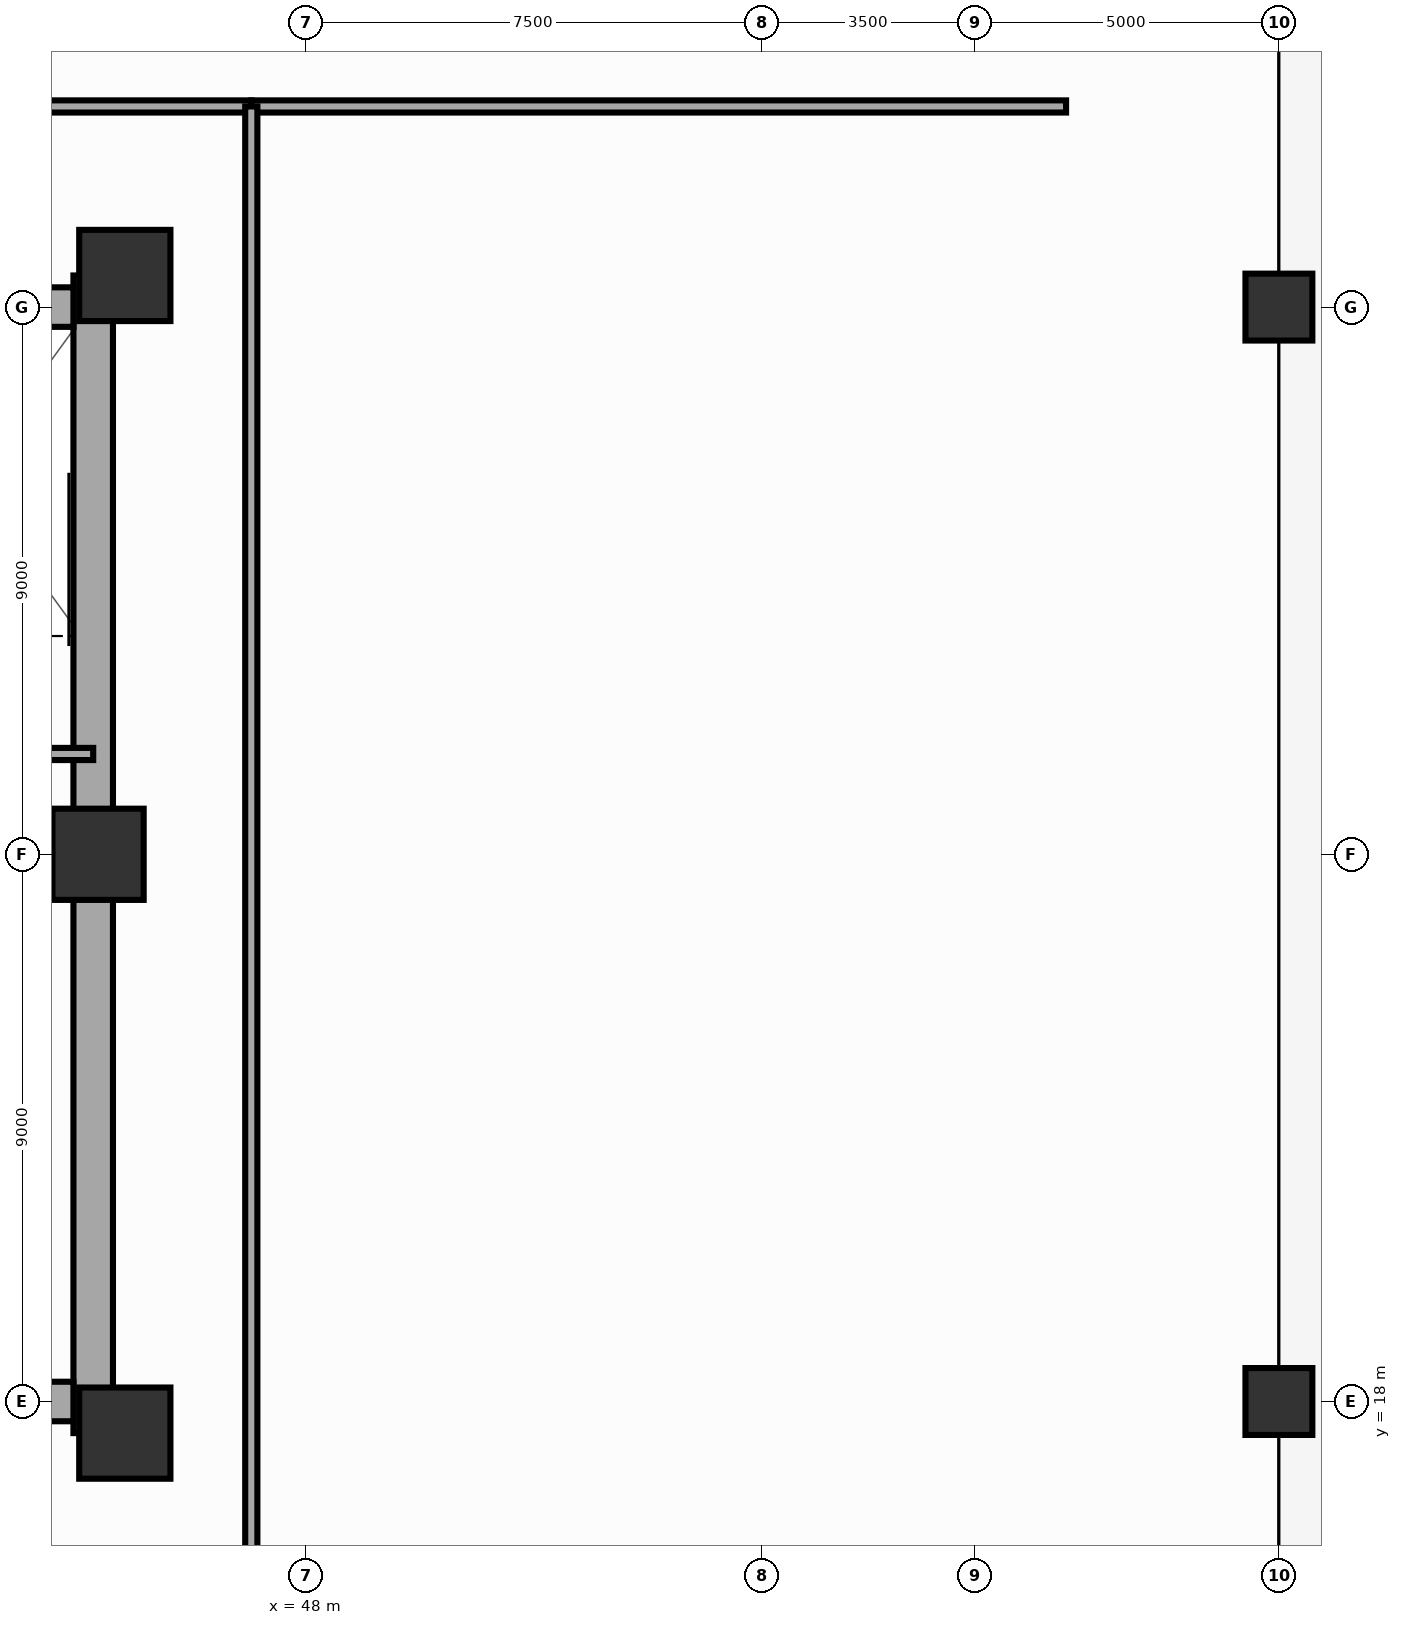
"""IFC4 building model, lengths in metres.
Left out: names, types, materials, properties, quantities, classifications, styles, units other than length and angle.
Written with IfcOpenShell. Run it as: python <this file> out.ifc"""

import sys

from ifc_helpers import new_model, si_unit, direction, frame, frame_2d, origin, origin_2d, place, context, subcontext, project, spatial, rectangle, extrude, source, transform, mapped, element, fill, save


model = new_model("IFC4")
c1 = context("Model", 3, precision=1e-05, world=origin(), true_north=direction((0.0, 1.0)))
c2 = subcontext(c1, "Body", "Model", "MODEL_VIEW")
j1 = project(units=[si_unit("LENGTHUNIT", "METRE"), si_unit("PLANEANGLEUNIT", "RADIAN")], contexts=[c1])
p1 = place(None, origin())
s1 = spatial("IfcSite", under=j1, at=p1, CompositionType="ELEMENT")
p2 = place(p1, origin())
s2 = spatial("IfcBuilding", under=s1, at=p2, CompositionType="ELEMENT")
p3 = place(p2, frame((0.0, 0.0, 70.4)))
s3 = spatial("IfcBuildingStorey", under=s2, at=p3, CompositionType="ELEMENT", Elevation=70.4)
p4 = place(p3, frame((44.5, 17.48, 0.0), z_axis=(0.0, 0.0, 1.0), x_axis=(0.0, 1.0, 0.0)))
e1 = element("IfcWall", 1, at=p4, inside=s3, PredefinedType="SHEAR", context=c2, shape_type="SweptSolid", body=[
    extrude(rectangle(XDim=19.04, YDim=0.65, at=frame_2d((9.52, 0.0))), origin(), (0.0, 0.0, 1.0), 3.95),
])
p5 = place(p4, frame((12.67, 0.0, 0.0), z_axis=(0.0, 0.0, 1.0), x_axis=(-1.0, 0.0, 0.0)))
e2 = element("IfcOpeningElement", 2, at=p5, cuts=e1, PredefinedType="OPENING", context=c2, shape_type="SweptSolid", body=[
    extrude(rectangle(XDim=1.1, YDim=2.15, at=frame_2d((0.55, 1.075))), frame((0.0, 0.337, 0.0), z_axis=(0.0, -1.0, 0.0), x_axis=(1.0, 0.0, 0.0)), (0.0, 0.0, 1.0), 0.674),
])
p6 = place(p3, frame((31.825, 18.0, 0.0), z_axis=(0.0, 0.0, 1.0), x_axis=(1.0, 0.0, 0.0)))
e3 = element("IfcWall", 3, at=p6, inside=s3, PredefinedType="SHEAR", context=c2, shape_type="SweptSolid", body=[
    extrude(rectangle(XDim=12.35, YDim=0.65, at=frame_2d((6.175, 0.0))), origin(), (0.0, 0.0, 1.0), 3.95),
])
p7 = place(p3, frame((31.825, 36.0, 0.0), z_axis=(0.0, 0.0, 1.0), x_axis=(1.0, 0.0, 0.0)))
e4 = element("IfcWall", 4, at=p7, inside=s3, PredefinedType="SHEAR", context=c2, shape_type="SweptSolid", body=[
    extrude(rectangle(XDim=12.35, YDim=0.65, at=frame_2d((6.175, 0.0))), origin(), (0.0, 0.0, 1.0), 3.95),
])
p8 = place(p7, frame((5.125, 0.0, 0.0), z_axis=(0.0, 0.0, 1.0), x_axis=(-1.0, 0.0, 0.0)))
e5 = element("IfcOpeningElement", 5, at=p8, cuts=e4, PredefinedType="OPENING", context=c2, shape_type="SweptSolid", body=[
    extrude(rectangle(XDim=1.4, YDim=2.15, at=frame_2d((0.7, 1.075))), frame((0.0, 0.337, 0.0), z_axis=(0.0, -1.0, 0.0), x_axis=(1.0, 0.0, 0.0)), (0.0, 0.0, 1.0), 0.674),
])
m1 = source(origin(), c2, "Body", "SweptSolid", [
    extrude(rectangle(XDim=1.5, YDim=1.5, at=origin_2d()), origin(), (0.0, 0.0, 1.0), 3.95),
])
for number, where, z_axis, x_axis in (
    (6, (45.02, 17.48, 0.0), (0.0, 0.0, 1.0), (1.0, 0.0, 0.0)),
    (7, (45.02, 36.52, 0.0), (0.0, 0.0, 1.0), (1.0, 0.0, 0.0)),
    (8, (44.58, 27.0, 0.0), (0.0, 0.0, 1.0), (1.0, 0.0, 0.0)),
):
    element("IfcColumn", number, at=place(p3, frame(where, z_axis=z_axis, x_axis=x_axis)), inside=s3, PredefinedType="COLUMN", context=c2, shape_type="MappedRepresentation", body=[
        mapped(m1, transform((0.0, 0.0, 0.0), scale=1.0)),
    ])
m2 = source(origin(), c2, "Body", "SweptSolid", [
    extrude(rectangle(XDim=1.1, YDim=1.1, at=origin_2d()), origin(), (0.0, 0.0, 1.0), 3.95),
])
for number, where, z_axis, x_axis in (
    (9, (64.0, 18.0, 0.0), (0.0, 0.0, 1.0), (1.0, 0.0, 0.0)),
    (10, (64.0, 36.0, 0.0), (0.0, 0.0, 1.0), (1.0, 0.0, 0.0)),
):
    element("IfcColumn", number, at=place(p3, frame(where, z_axis=z_axis, x_axis=x_axis)), inside=s3, PredefinedType="COLUMN", context=c2, shape_type="MappedRepresentation", body=[
        mapped(m2, transform((0.0, 0.0, 0.0), scale=1.0)),
    ])
p9 = place(p3, frame((40.57, 28.65, 0.0), z_axis=(0.0, 0.0, 1.0), x_axis=(1.0, 0.0, 0.0)))
e11 = element("IfcWall", 11, at=p9, inside=s3, PredefinedType="SOLIDWALL", context=c2, shape_type="SweptSolid", body=[
    extrude(rectangle(XDim=3.93, YDim=0.2, at=frame_2d((1.965, 0.0))), origin(), (0.0, 0.0, 1.0), 3.69),
])
p10 = place(p3, frame((28.9, 39.3, 0.0), z_axis=(0.0, 0.0, 1.0), x_axis=(1.0, 0.0, 0.0)))
e12 = element("IfcWall", 12, at=p10, inside=s3, PredefinedType="PARTITIONING", context=c2, shape_type="SweptSolid", body=[
    extrude(rectangle(XDim=18.2, YDim=0.2, at=frame_2d((9.1, 0.0))), origin(), (0.0, 0.0, 1.0), 3.61),
])
p11 = place(p10, frame((8.55, 0.0, 0.0)))
e13 = element("IfcOpeningElement", 13, at=p11, cuts=e12, PredefinedType="OPENING", context=c2, shape_type="SweptSolid", body=[
    extrude(rectangle(XDim=1.1, YDim=2.15, at=frame_2d((0.55, 1.075))), frame((0.0, 0.112, 0.0), z_axis=(0.0, -1.0, 0.0), x_axis=(1.0, 0.0, 0.0)), (0.0, 0.0, 1.0), 0.224),
])
p12 = place(p3, frame((47.1, 39.3, 0.0), z_axis=(0.0, 0.0, 1.0), x_axis=(1.0, 0.0, 0.0)))
e14 = element("IfcWall", 14, at=p12, inside=s3, PredefinedType="PARTITIONING", context=c2, shape_type="SweptSolid", body=[
    extrude(rectangle(XDim=13.4, YDim=0.2, at=frame_2d((6.7, 0.0))), origin(), (0.0, 0.0, 1.0), 3.61),
])
p13 = place(p3, frame((47.1, 14.5, 0.0), z_axis=(0.0, 0.0, 1.0), x_axis=(0.0, 1.0, 0.0)))
e15 = element("IfcWall", 15, at=p13, inside=s3, PredefinedType="PARTITIONING", context=c2, shape_type="SweptSolid", body=[
    extrude(rectangle(XDim=24.8, YDim=0.2, at=frame_2d((12.4, 0.0))), origin(), (0.0, 0.0, 1.0), 3.61),
])
p14 = place(p13, frame((11.85, 0.0, 0.0)))
e16 = element("IfcOpeningElement", 16, at=p14, cuts=e15, PredefinedType="OPENING", context=c2, shape_type="SweptSolid", body=[
    extrude(rectangle(XDim=1.1, YDim=2.15, at=frame_2d((0.55, 1.075))), frame((0.0, 0.112, 0.0), z_axis=(0.0, -1.0, 0.0), x_axis=(1.0, 0.0, 0.0)), (0.0, 0.0, 1.0), 0.224),
])
m3 = source(origin(), c2, "Body", "SweptSolid", [
    extrude(rectangle(XDim=1.1, YDim=2.15, at=frame_2d((0.55, 1.075))), frame((0.0, 0.025, 0.0), z_axis=(0.0, -1.0, 0.0), x_axis=(1.0, 0.0, 0.0)), (0.0, 0.0, 1.0), 0.05),
])
p15 = place(p5, origin())
e17 = element("IfcDoor", 17, at=p15, inside=s3, OperationType="SINGLE_SWING_RIGHT", PredefinedType="DOOR", context=c2, shape_type="MappedRepresentation", body=[
    mapped(m3, transform((0.0, 0.0, 0.0), scale=1.0)),
])
fill(e2, e17)
p16 = place(p14, origin())
e18 = element("IfcDoor", 18, at=p16, inside=s3, OperationType="SINGLE_SWING_RIGHT", PredefinedType="DOOR", context=c2, shape_type="MappedRepresentation", body=[
    mapped(m3, transform((0.0, 0.0, 0.0), scale=1.0)),
])
fill(e16, e18)
save(model, sys.argv[1])
